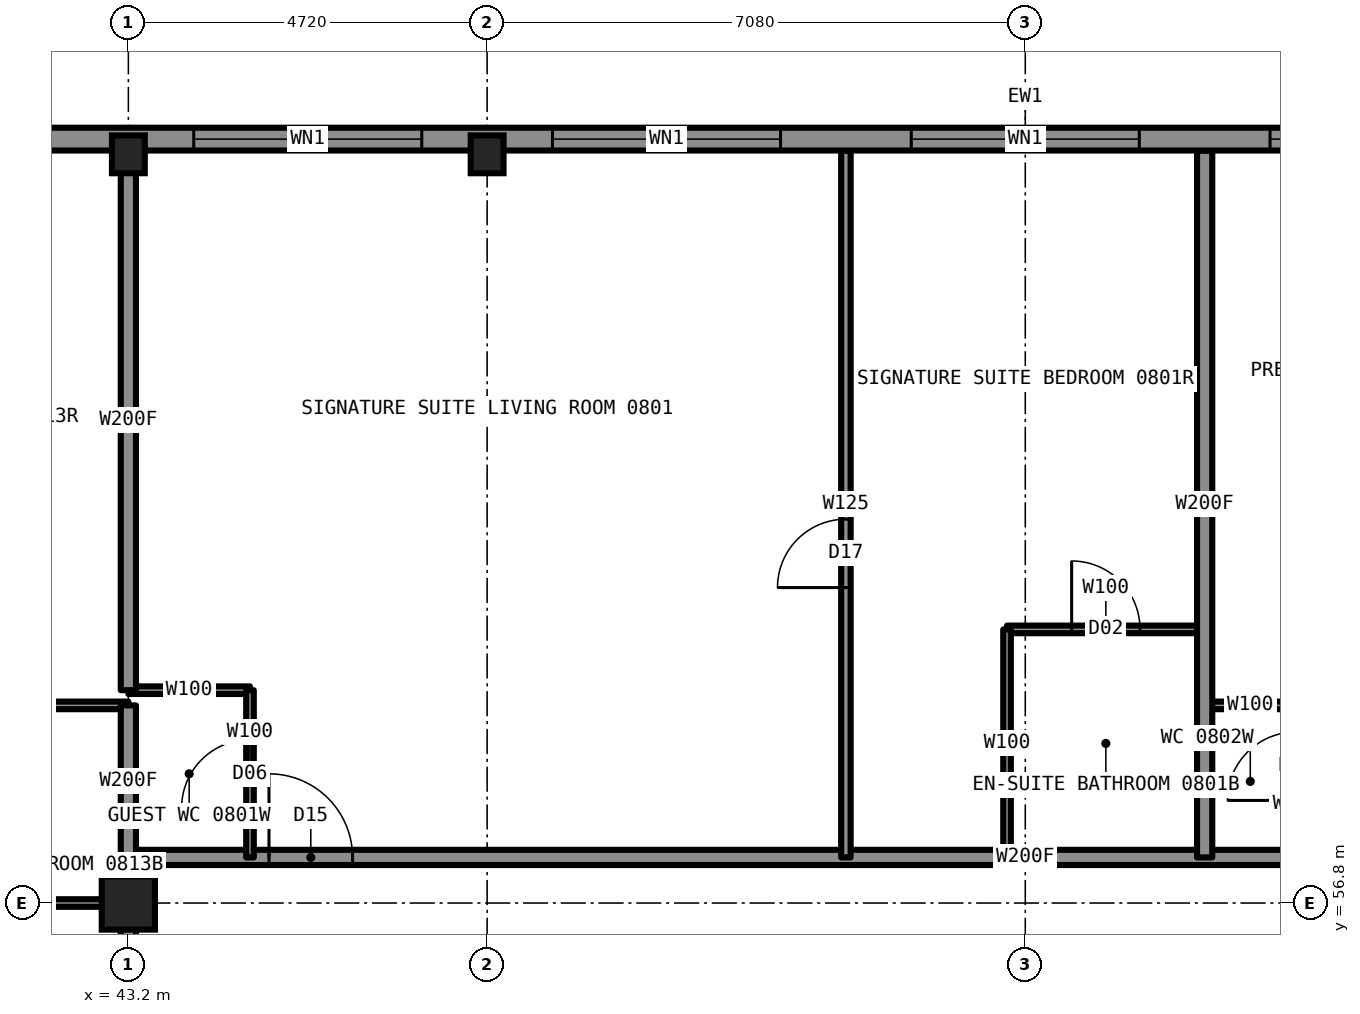
"""IFC4 building model, lengths in metres.
Left out: names, types, materials, properties, quantities, classifications, styles, units other than length and angle.
Written with IfcOpenShell. Run it as: python <this file> out.ifc"""

import sys

from ifc_helpers import new_model, si_unit, direction, frame, frame_2d, origin, origin_2d, place, context, subcontext, project, spatial, rectangle, hollow_rectangle, i_section, extrude, element, fill, save


model = new_model("IFC4")
c1 = context("Model", 3, precision=1e-05, world=origin(), true_north=direction((0.0, 1.0)))
c2 = subcontext(c1, "Body", "Model", "MODEL_VIEW")
j1 = project(units=[si_unit("LENGTHUNIT", "METRE"), si_unit("PLANEANGLEUNIT", "RADIAN")], contexts=[c1])
p1 = place(None, origin())
s1 = spatial("IfcSite", under=j1, at=p1, CompositionType="ELEMENT")
p2 = place(p1, origin())
s2 = spatial("IfcBuilding", under=s1, at=p2, CompositionType="ELEMENT")
p3 = place(p2, frame((0.0, 0.0, 28.5)))
s3 = spatial("IfcBuildingStorey", under=s2, at=p3, CompositionType="ELEMENT", Elevation=28.5)
for number, where, z_axis, x_axis in (
    (1, (43.2, 66.65, 0.0), (0.0, 0.0, 1.0), (1.0, 0.0, 0.0)),
    (2, (47.92, 66.65, 0.0), (0.0, 0.0, 1.0), (1.0, 0.0, 0.0)),
):
    element("IfcColumn", number, at=place(p3, frame(where, z_axis=z_axis, x_axis=x_axis)), inside=s3, PredefinedType="COLUMN", context=c2, shape_type="SweptSolid", body=[
        extrude(i_section(OverallWidth=0.432, OverallDepth=0.498, WebThickness=0.056, FlangeThickness=0.089, at=origin_2d()), origin(), (0.0, 0.0, 1.0), 3.5),
    ])
p4 = place(p3, frame((43.2, 56.8, 0.0), z_axis=(0.0, 0.0, 1.0), x_axis=(1.0, 0.0, 0.0)))
e3 = element("IfcColumn", 3, at=p4, inside=s3, PredefinedType="COLUMN", context=c2, shape_type="SweptSolid", body=[
    extrude(hollow_rectangle(XDim=0.7, YDim=0.7, WallThickness=0.06, at=origin_2d()), origin(), (0.0, 0.0, 1.0), 3.5),
])
p5 = place(p3, frame((40.6, 56.8, 0.0), z_axis=(0.0, 0.0, 1.0), x_axis=(1.0, 0.0, 0.0)))
e4 = element("IfcWall", 4, at=p5, inside=s3, PredefinedType="PARTITIONING", context=c2, shape_type="SweptSolid", body=[
    extrude(rectangle(XDim=2.6, YDim=0.1, at=frame_2d((1.3, 0.0))), origin(), (0.0, 0.0, 1.0), 2.573),
])
p6 = place(p3, frame((43.2, 57.4, 0.0), z_axis=(0.0, 0.0, 1.0), x_axis=(1.0, 0.0, 0.0)))
e5 = element("IfcWall", 5, at=p6, inside=s3, PredefinedType="PARTITIONING", context=c2, shape_type="SweptSolid", body=[
    extrude(rectangle(XDim=23.6, YDim=0.2, at=frame_2d((11.8, 0.0))), origin(), (0.0, 0.0, 1.0), 3.33),
])
p7 = place(p6, frame((1.85, 0.0, 0.0)))
e6 = element("IfcOpeningElement", 6, at=p7, cuts=e5, PredefinedType="OPENING", context=c2, shape_type="SweptSolid", body=[
    extrude(rectangle(XDim=1.1, YDim=2.2, at=frame_2d((0.55, 1.1))), frame((0.0, 0.11, 0.0), z_axis=(0.0, -1.0, 0.0), x_axis=(1.0, 0.0, 0.0)), (0.0, 0.0, 1.0), 0.22),
])
p8 = place(p6, frame((15.62, 0.0, 0.0)))
e7 = element("IfcOpeningElement", 7, at=p8, cuts=e5, PredefinedType="OPENING", context=c2, shape_type="SweptSolid", body=[
    extrude(rectangle(XDim=1.0, YDim=2.2, at=frame_2d((0.5, 1.1))), frame((0.0, 0.11, 0.0), z_axis=(0.0, -1.0, 0.0), x_axis=(1.0, 0.0, 0.0)), (0.0, 0.0, 1.0), 0.22),
])
p9 = place(p6, frame((20.34, 0.0, 0.0)))
e8 = element("IfcOpeningElement", 8, at=p9, cuts=e5, PredefinedType="OPENING", context=c2, shape_type="SweptSolid", body=[
    extrude(rectangle(XDim=1.0, YDim=2.2, at=frame_2d((0.5, 1.1))), frame((0.0, 0.11, 0.0), z_axis=(0.0, -1.0, 0.0), x_axis=(1.0, 0.0, 0.0)), (0.0, 0.0, 1.0), 0.22),
])
p10 = place(p3, frame((40.6, 59.4, 0.0), z_axis=(0.0, 0.0, 1.0), x_axis=(1.0, 0.0, 0.0)))
e9 = element("IfcWall", 9, at=p10, inside=s3, PredefinedType="PARTITIONING", context=c2, shape_type="SweptSolid", body=[
    extrude(rectangle(XDim=2.6, YDim=0.1, at=frame_2d((1.3, 0.0))), origin(), (0.0, 0.0, 1.0), 3.33),
])
p11 = place(p3, frame((57.36, 59.4, 0.0), z_axis=(0.0, 0.0, 1.0), x_axis=(1.0, 0.0, 0.0)))
e10 = element("IfcWall", 10, at=p11, inside=s3, PredefinedType="PARTITIONING", context=c2, shape_type="SweptSolid", body=[
    extrude(rectangle(XDim=1.2, YDim=0.1, at=frame_2d((0.6, 0.0))), origin(), (0.0, 0.0, 1.0), 3.33),
])
p12 = place(p3, frame((43.2, 59.6, 0.0), z_axis=(0.0, 0.0, 1.0), x_axis=(1.0, 0.0, 0.0)))
e11 = element("IfcWall", 11, at=p12, inside=s3, PredefinedType="PARTITIONING", context=c2, shape_type="SweptSolid", body=[
    extrude(rectangle(XDim=1.6, YDim=0.1, at=frame_2d((0.8, 0.0))), origin(), (0.0, 0.0, 1.0), 3.33),
])
p13 = place(p3, frame((54.76, 60.4, 0.0), z_axis=(0.0, 0.0, 1.0), x_axis=(1.0, 0.0, 0.0)))
e12 = element("IfcWall", 12, at=p13, inside=s3, PredefinedType="PARTITIONING", context=c2, shape_type="SweptSolid", body=[
    extrude(rectangle(XDim=2.6, YDim=0.1, at=frame_2d((1.3, 0.0))), origin(), (0.0, 0.0, 1.0), 3.33),
])
p14 = place(p13, frame((0.85, 0.0, 0.0)))
e13 = element("IfcOpeningElement", 13, at=p14, cuts=e12, PredefinedType="OPENING", context=c2, shape_type="SweptSolid", body=[
    extrude(rectangle(XDim=0.9, YDim=2.1, at=frame_2d((0.45, 1.05))), frame((0.0, 0.06, 0.0), z_axis=(0.0, -1.0, 0.0), x_axis=(1.0, 0.0, 0.0)), (0.0, 0.0, 1.0), 0.12),
])
p15 = place(p3, frame((54.76, 57.4, 0.0), z_axis=(0.0, 0.0, 1.0), x_axis=(0.0, 1.0, 0.0)))
e14 = element("IfcWall", 14, at=p15, inside=s3, PredefinedType="PARTITIONING", context=c2, shape_type="SweptSolid", body=[
    extrude(rectangle(XDim=3.0, YDim=0.1, at=frame_2d((1.5, 0.0))), origin(), (0.0, 0.0, 1.0), 3.33),
])
p16 = place(p3, frame((44.8, 57.4, 0.0), z_axis=(0.0, 0.0, 1.0), x_axis=(0.0, 1.0, 0.0)))
e15 = element("IfcWall", 15, at=p16, inside=s3, PredefinedType="PARTITIONING", context=c2, shape_type="SweptSolid", body=[
    extrude(rectangle(XDim=2.2, YDim=0.1, at=frame_2d((1.1, 0.0))), origin(), (0.0, 0.0, 1.0), 3.33),
])
p17 = place(p16, frame((0.65, 0.0, 0.0)))
e16 = element("IfcOpeningElement", 16, at=p17, cuts=e15, PredefinedType="OPENING", context=c2, shape_type="SweptSolid", body=[
    extrude(rectangle(XDim=0.9, YDim=2.1, at=frame_2d((0.45, 1.05))), frame((0.0, 0.06, 0.0), z_axis=(0.0, -1.0, 0.0), x_axis=(1.0, 0.0, 0.0)), (0.0, 0.0, 1.0), 0.12),
])
p18 = place(p3, frame((43.2, 33.22, 0.0), z_axis=(0.0, 0.0, 1.0), x_axis=(0.0, 1.0, 0.0)))
e17 = element("IfcWall", 17, at=p18, inside=s3, PredefinedType="PARTITIONING", context=c2, shape_type="SweptSolid", body=[
    extrude(rectangle(XDim=23.56, YDim=0.2, at=frame_2d((11.78, 0.0))), origin(), (0.0, 0.0, 1.0), 3.33),
])
p19 = place(p18, frame((6.16, 0.0, 0.0)))
e18 = element("IfcOpeningElement", 18, at=p19, cuts=e17, PredefinedType="OPENING", context=c2, shape_type="SweptSolid", body=[
    extrude(rectangle(XDim=1.0, YDim=2.2, at=frame_2d((0.5, 1.1))), frame((0.0, 0.11, 0.0), z_axis=(0.0, -1.0, 0.0), x_axis=(1.0, 0.0, 0.0)), (0.0, 0.0, 1.0), 0.22),
])
p20 = place(p18, frame((11.68, 0.0, 0.0)))
e19 = element("IfcOpeningElement", 19, at=p20, cuts=e17, PredefinedType="OPENING", context=c2, shape_type="SweptSolid", body=[
    extrude(rectangle(XDim=1.0, YDim=2.2, at=frame_2d((0.5, 1.1))), frame((0.0, 0.11, 0.0), z_axis=(0.0, -1.0, 0.0), x_axis=(1.0, 0.0, 0.0)), (0.0, 0.0, 1.0), 0.22),
])
p21 = place(p18, frame((14.54, 0.0, 0.0)))
e20 = element("IfcOpeningElement", 20, at=p21, cuts=e17, PredefinedType="OPENING", context=c2, shape_type="SweptSolid", body=[
    extrude(rectangle(XDim=1.0, YDim=2.2, at=frame_2d((0.5, 1.1))), frame((0.0, 0.11, 0.0), z_axis=(0.0, -1.0, 0.0), x_axis=(1.0, 0.0, 0.0)), (0.0, 0.0, 1.0), 0.22),
])
p22 = place(p18, frame((21.83, 0.0, 0.0)))
e21 = element("IfcOpeningElement", 21, at=p22, cuts=e17, PredefinedType="OPENING", context=c2, shape_type="SweptSolid", body=[
    extrude(rectangle(XDim=1.1, YDim=2.2, at=frame_2d((0.55, 1.1))), frame((0.0, 0.11, 0.0), z_axis=(0.0, -1.0, 0.0), x_axis=(1.0, 0.0, 0.0)), (0.0, 0.0, 1.0), 0.22),
])
p23 = place(p18, frame((0.63, 0.0, 0.0)))
e22 = element("IfcOpeningElement", 22, at=p23, cuts=e17, PredefinedType="OPENING", context=c2, shape_type="SweptSolid", body=[
    extrude(rectangle(XDim=1.1, YDim=2.2, at=frame_2d((0.55, 1.1))), frame((0.0, 0.11, 0.0), z_axis=(0.0, -1.0, 0.0), x_axis=(1.0, 0.0, 0.0)), (0.0, 0.0, 1.0), 0.22),
])
p24 = place(p3, frame((43.2, 57.4, 0.0), z_axis=(0.0, 0.0, 1.0), x_axis=(0.0, 1.0, 0.0)))
e23 = element("IfcWall", 23, at=p24, inside=s3, PredefinedType="PARTITIONING", context=c2, shape_type="SweptSolid", body=[
    extrude(rectangle(XDim=2.0, YDim=0.2, at=frame_2d((1.0, 0.0))), origin(), (0.0, 0.0, 1.0), 2.573),
])
p25 = place(p3, frame((43.2, 59.6, 0.0), z_axis=(0.0, 0.0, 1.0), x_axis=(0.0, 1.0, 0.0)))
e24 = element("IfcWall", 24, at=p25, inside=s3, PredefinedType="PARTITIONING", context=c2, shape_type="SweptSolid", body=[
    extrude(rectangle(XDim=7.1, YDim=0.2, at=frame_2d((3.55, 0.0))), origin(), (0.0, 0.0, 1.0), 2.573),
])
p26 = place(p3, frame((52.64, 57.4, 0.0), z_axis=(0.0, 0.0, 1.0), x_axis=(0.0, 1.0, 0.0)))
e25 = element("IfcWall", 25, at=p26, inside=s3, PredefinedType="PARTITIONING", context=c2, shape_type="SweptSolid", body=[
    extrude(rectangle(XDim=9.3, YDim=0.125, at=frame_2d((4.65, 0.0))), origin(), (0.0, 0.0, 1.0), 3.33),
])
p27 = place(p26, frame((3.55, 0.0, 0.0)))
e26 = element("IfcOpeningElement", 26, at=p27, cuts=e25, PredefinedType="OPENING", context=c2, shape_type="SweptSolid", body=[
    extrude(rectangle(XDim=0.9, YDim=2.2, at=frame_2d((0.45, 1.1))), frame((0.0, 0.073, 0.0), z_axis=(0.0, -1.0, 0.0), x_axis=(1.0, 0.0, 0.0)), (0.0, 0.0, 1.0), 0.145),
])
p28 = place(p3, frame((57.36, 57.4, 0.0), z_axis=(0.0, 0.0, 1.0), x_axis=(0.0, 1.0, 0.0)))
e27 = element("IfcWall", 27, at=p28, inside=s3, PredefinedType="PARTITIONING", context=c2, shape_type="SweptSolid", body=[
    extrude(rectangle(XDim=9.3, YDim=0.2, at=frame_2d((4.65, 0.0))), origin(), (0.0, 0.0, 1.0), 3.33),
])
p29 = place(p3, frame((71.5, 66.85, 0.0), z_axis=(0.0, 0.0, 1.0), x_axis=(-1.0, 0.0, 0.0)))
e28 = element("IfcWall", 28, at=p29, inside=s3, PredefinedType="SOLIDWALL", context=c2, shape_type="SweptSolid", body=[
    extrude(rectangle(XDim=33.0, YDim=0.3, at=frame_2d((16.5, 0.0))), origin(), (0.0, 0.0, 1.0), 2.83),
])
p30 = place(p29, frame((0.85, 0.0, 0.5)))
e29 = element("IfcOpeningElement", 29, at=p30, cuts=e28, PredefinedType="OPENING", context=c2, shape_type="SweptSolid", body=[
    extrude(rectangle(XDim=3.0, YDim=2.0, at=frame_2d((1.5, 1.0))), frame((0.0, 0.16, 0.0), z_axis=(0.0, -1.0, 0.0), x_axis=(1.0, 0.0, 0.0)), (0.0, 0.0, 1.0), 0.32),
])
p31 = place(p29, frame((5.56, 0.0, 0.5)))
e30 = element("IfcOpeningElement", 30, at=p31, cuts=e28, PredefinedType="OPENING", context=c2, shape_type="SweptSolid", body=[
    extrude(rectangle(XDim=3.0, YDim=2.0, at=frame_2d((1.5, 1.0))), frame((0.0, 0.16, 0.0), z_axis=(0.0, -1.0, 0.0), x_axis=(1.0, 0.0, 0.0)), (0.0, 0.0, 1.0), 0.32),
])
p32 = place(p29, frame((10.28, 0.0, 0.5)))
e31 = element("IfcOpeningElement", 31, at=p32, cuts=e28, PredefinedType="OPENING", context=c2, shape_type="SweptSolid", body=[
    extrude(rectangle(XDim=3.0, YDim=2.0, at=frame_2d((1.5, 1.0))), frame((0.0, 0.16, 0.0), z_axis=(0.0, -1.0, 0.0), x_axis=(1.0, 0.0, 0.0)), (0.0, 0.0, 1.0), 0.32),
])
p33 = place(p29, frame((15.0, 0.0, 0.5)))
e32 = element("IfcOpeningElement", 32, at=p33, cuts=e28, PredefinedType="OPENING", context=c2, shape_type="SweptSolid", body=[
    extrude(rectangle(XDim=3.0, YDim=2.0, at=frame_2d((1.5, 1.0))), frame((0.0, 0.16, 0.0), z_axis=(0.0, -1.0, 0.0), x_axis=(1.0, 0.0, 0.0)), (0.0, 0.0, 1.0), 0.32),
])
p34 = place(p29, frame((19.72, 0.0, 0.5)))
e33 = element("IfcOpeningElement", 33, at=p34, cuts=e28, PredefinedType="OPENING", context=c2, shape_type="SweptSolid", body=[
    extrude(rectangle(XDim=3.0, YDim=2.0, at=frame_2d((1.5, 1.0))), frame((0.0, 0.16, 0.0), z_axis=(0.0, -1.0, 0.0), x_axis=(1.0, 0.0, 0.0)), (0.0, 0.0, 1.0), 0.32),
])
p35 = place(p29, frame((24.44, 0.0, 0.5)))
e34 = element("IfcOpeningElement", 34, at=p35, cuts=e28, PredefinedType="OPENING", context=c2, shape_type="SweptSolid", body=[
    extrude(rectangle(XDim=3.0, YDim=2.0, at=frame_2d((1.5, 1.0))), frame((0.0, 0.16, 0.0), z_axis=(0.0, -1.0, 0.0), x_axis=(1.0, 0.0, 0.0)), (0.0, 0.0, 1.0), 0.32),
])
p36 = place(p29, frame((29.15, 0.0, 0.5)))
e35 = element("IfcOpeningElement", 35, at=p36, cuts=e28, PredefinedType="OPENING", context=c2, shape_type="SweptSolid", body=[
    extrude(rectangle(XDim=3.0, YDim=2.0, at=frame_2d((1.5, 1.0))), frame((0.0, 0.16, 0.0), z_axis=(0.0, -1.0, 0.0), x_axis=(1.0, 0.0, 0.0)), (0.0, 0.0, 1.0), 0.32),
])
p37 = place(p3, frame((43.2, 56.78, 0.0), z_axis=(0.0, 0.0, 1.0), x_axis=(0.0, 1.0, 0.0)))
e36 = element("IfcWall", 36, at=p37, inside=s3, PredefinedType="PARTITIONING", context=c2, shape_type="SweptSolid", body=[
    extrude(rectangle(XDim=0.62, YDim=0.2, at=frame_2d((0.31, 0.0))), origin(), (0.0, 0.0, 1.0), 2.573),
])
p38 = place(p7, origin())
e37 = element("IfcDoor", 37, at=p38, inside=s3, OperationType="SINGLE_SWING_LEFT", PredefinedType="DOOR", context=c2, shape_type="SweptSolid", body=[
    extrude(rectangle(XDim=1.1, YDim=2.2, at=frame_2d((0.55, 1.1))), frame((0.0, 0.025, 0.0), z_axis=(0.0, -1.0, 0.0), x_axis=(1.0, 0.0, 0.0)), (0.0, 0.0, 1.0), 0.05),
])
fill(e6, e37)
p39 = place(p14, origin())
e38 = element("IfcDoor", 38, at=p39, inside=s3, OperationType="SINGLE_SWING_RIGHT", PredefinedType="DOOR", context=c2, shape_type="SweptSolid", body=[
    extrude(rectangle(XDim=0.9, YDim=2.1, at=frame_2d((0.45, 1.05))), frame((0.0, 0.025, 0.0), z_axis=(0.0, -1.0, 0.0), x_axis=(1.0, 0.0, 0.0)), (0.0, 0.0, 1.0), 0.05),
])
fill(e13, e38)
p40 = place(p27, origin())
e39 = element("IfcDoor", 39, at=p40, inside=s3, OperationType="SINGLE_SWING_LEFT", PredefinedType="DOOR", context=c2, shape_type="SweptSolid", body=[
    extrude(rectangle(XDim=0.9, YDim=2.2, at=frame_2d((0.45, 1.1))), frame((0.0, 0.025, 0.0), z_axis=(0.0, -1.0, 0.0), x_axis=(1.0, 0.0, 0.0)), (0.0, 0.0, 1.0), 0.05),
])
fill(e26, e39)
p41 = place(p17, origin())
e40 = element("IfcDoor", 40, at=p41, inside=s3, OperationType="SINGLE_SWING_LEFT", PredefinedType="DOOR", context=c2, shape_type="SweptSolid", body=[
    extrude(rectangle(XDim=0.9, YDim=2.1, at=frame_2d((0.45, 1.05))), frame((0.0, 0.025, 0.0), z_axis=(0.0, -1.0, 0.0), x_axis=(1.0, 0.0, 0.0)), (0.0, 0.0, 1.0), 0.05),
])
fill(e16, e40)
p42 = place(p32, origin())
e41 = element("IfcWindow", 41, at=p42, inside=s3, PartitioningType="SINGLE_PANEL", PredefinedType="WINDOW", context=c2, shape_type="SweptSolid", body=[
    extrude(rectangle(XDim=3.0, YDim=2.0, at=frame_2d((1.5, 1.0))), frame((0.0, 0.03, 0.0), z_axis=(0.0, -1.0, 0.0), x_axis=(1.0, 0.0, 0.0)), (0.0, 0.0, 1.0), 0.06),
])
fill(e31, e41)
p43 = place(p33, origin())
e42 = element("IfcWindow", 42, at=p43, inside=s3, PartitioningType="SINGLE_PANEL", PredefinedType="WINDOW", context=c2, shape_type="SweptSolid", body=[
    extrude(rectangle(XDim=3.0, YDim=2.0, at=frame_2d((1.5, 1.0))), frame((0.0, 0.03, 0.0), z_axis=(0.0, -1.0, 0.0), x_axis=(1.0, 0.0, 0.0)), (0.0, 0.0, 1.0), 0.06),
])
fill(e32, e42)
p44 = place(p34, origin())
e43 = element("IfcWindow", 43, at=p44, inside=s3, PartitioningType="SINGLE_PANEL", PredefinedType="WINDOW", context=c2, shape_type="SweptSolid", body=[
    extrude(rectangle(XDim=3.0, YDim=2.0, at=frame_2d((1.5, 1.0))), frame((0.0, 0.03, 0.0), z_axis=(0.0, -1.0, 0.0), x_axis=(1.0, 0.0, 0.0)), (0.0, 0.0, 1.0), 0.06),
])
fill(e33, e43)
p45 = place(p35, origin())
e44 = element("IfcWindow", 44, at=p45, inside=s3, PartitioningType="SINGLE_PANEL", PredefinedType="WINDOW", context=c2, shape_type="SweptSolid", body=[
    extrude(rectangle(XDim=3.0, YDim=2.0, at=frame_2d((1.5, 1.0))), frame((0.0, 0.03, 0.0), z_axis=(0.0, -1.0, 0.0), x_axis=(1.0, 0.0, 0.0)), (0.0, 0.0, 1.0), 0.06),
])
fill(e34, e44)
p46 = place(p36, origin())
e45 = element("IfcWindow", 45, at=p46, inside=s3, PartitioningType="SINGLE_PANEL", PredefinedType="WINDOW", context=c2, shape_type="SweptSolid", body=[
    extrude(rectangle(XDim=3.0, YDim=2.0, at=frame_2d((1.5, 1.0))), frame((0.0, 0.03, 0.0), z_axis=(0.0, -1.0, 0.0), x_axis=(1.0, 0.0, 0.0)), (0.0, 0.0, 1.0), 0.06),
])
fill(e35, e45)
save(model, sys.argv[1])
